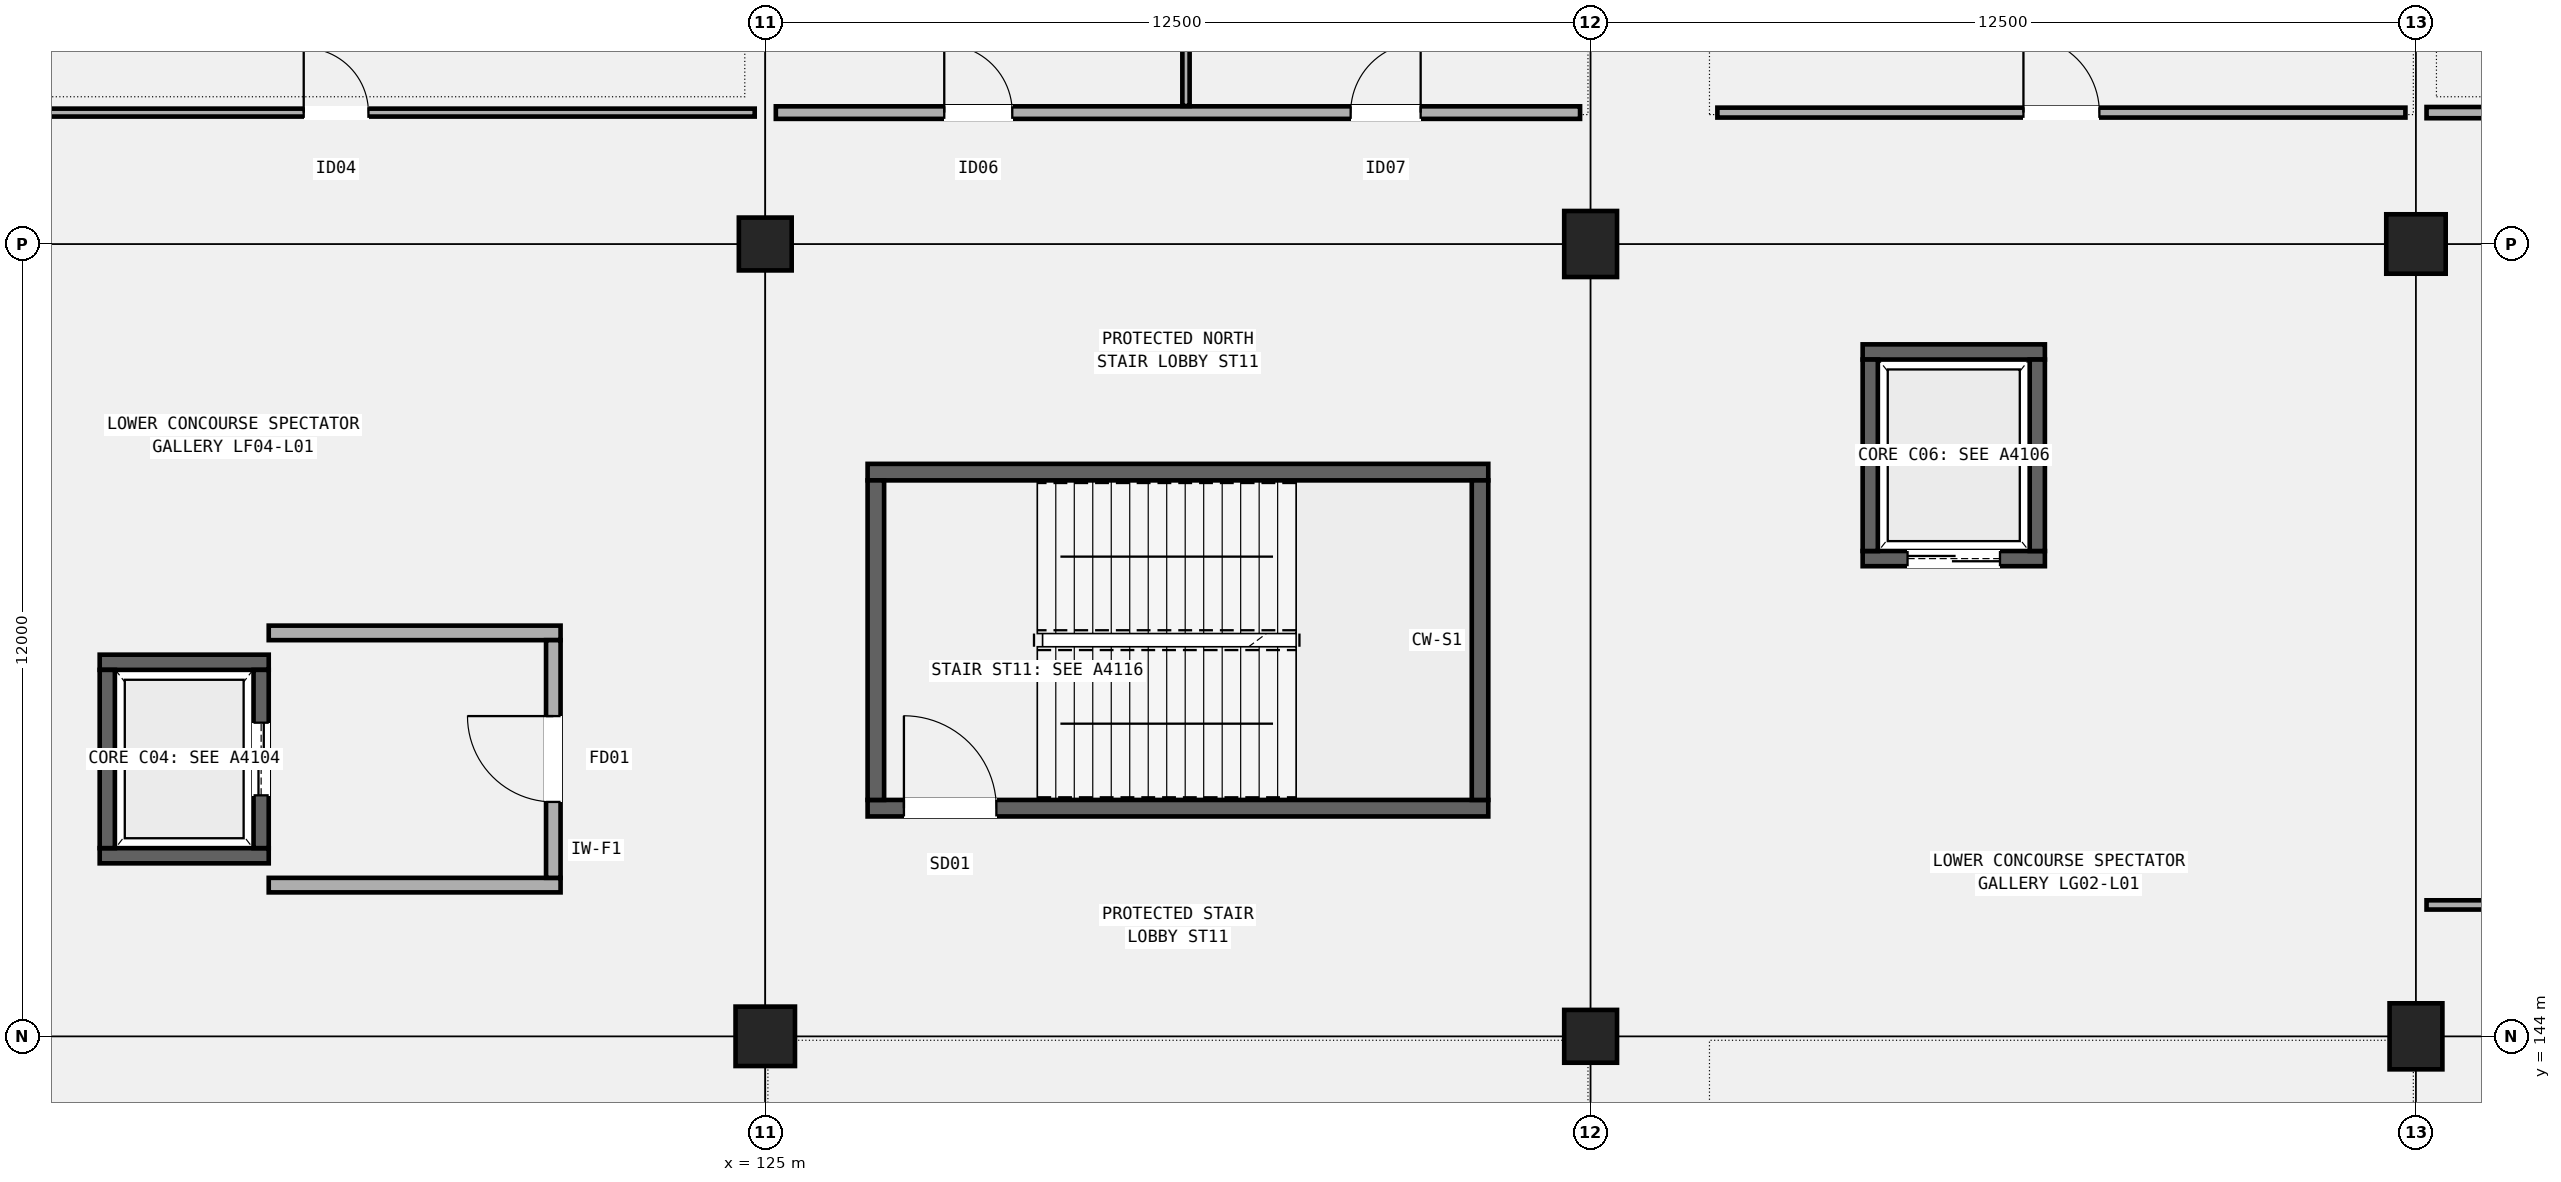
"""IFC4 building model, lengths in metres.
Left out: names, types, materials, properties, quantities, classifications, styles, units other than length and angle.
Written with IfcOpenShell. Run it as: python <this file> out.ifc"""

import sys

from ifc_helpers import new_model, si_unit, direction, frame, frame_2d, origin, origin_2d, place, context, subcontext, project, spatial, rectangle, extrude, element, fill, save


model = new_model("IFC4")
c1 = context("Model", 3, precision=1e-05, world=origin(), true_north=direction((0.0, 1.0)))
c2 = subcontext(c1, "Body", "Model", "MODEL_VIEW")
j1 = project(units=[si_unit("LENGTHUNIT", "METRE"), si_unit("PLANEANGLEUNIT", "RADIAN")], contexts=[c1])
p1 = place(None, origin())
s1 = spatial("IfcSite", under=j1, at=p1, CompositionType="ELEMENT")
p2 = place(p1, origin())
s2 = spatial("IfcBuilding", under=s1, at=p2, CompositionType="ELEMENT")
p3 = place(p2, frame((0.0, 0.0, 5.4)))
s3 = spatial("IfcBuildingStorey", under=s2, at=p3, CompositionType="ELEMENT", Elevation=5.4)
p4 = place(p3, frame((125.0, 144.0, 0.0), z_axis=(0.0, 0.0, 1.0), x_axis=(1.0, 0.0, 0.0)))
e1 = element("IfcColumn", 1, at=p4, inside=s3, PredefinedType="COLUMN", context=c2, shape_type="SweptSolid", body=[
    extrude(rectangle(XDim=0.9, YDim=0.9, at=origin_2d()), origin(), (0.0, 0.0, 1.0), 4.8),
])
for number, where, z_axis, x_axis in (
    (2, (125.0, 156.0, 0.0), (0.0, 0.0, 1.0), (1.0, 0.0, 0.0)),
    (3, (137.5, 144.0, 0.0), (0.0, 0.0, 1.0), (1.0, 0.0, 0.0)),
):
    element("IfcColumn", number, at=place(p3, frame(where, z_axis=z_axis, x_axis=x_axis)), inside=s3, PredefinedType="COLUMN", context=c2, shape_type="SweptSolid", body=[
        extrude(rectangle(XDim=0.8, YDim=0.8, at=origin_2d()), origin(), (0.0, 0.0, 1.0), 4.8),
    ])
for number, where, z_axis, x_axis in (
    (4, (137.5, 156.0, 0.0), (0.0, 0.0, 1.0), (1.0, 0.0, 0.0)),
    (5, (150.0, 144.0, 0.0), (0.0, 0.0, 1.0), (1.0, 0.0, 0.0)),
):
    element("IfcColumn", number, at=place(p3, frame(where, z_axis=z_axis, x_axis=x_axis)), inside=s3, PredefinedType="COLUMN", context=c2, shape_type="SweptSolid", body=[
        extrude(rectangle(XDim=0.8, YDim=1.0, at=origin_2d()), origin(), (0.0, 0.0, 1.0), 4.8),
    ])
p5 = place(p3, frame((150.0, 156.0, 0.0), z_axis=(0.0, 0.0, 1.0), x_axis=(1.0, 0.0, 0.0)))
e6 = element("IfcColumn", 6, at=p5, inside=s3, PredefinedType="COLUMN", context=c2, shape_type="SweptSolid", body=[
    extrude(rectangle(XDim=0.9, YDim=0.9, at=origin_2d()), origin(), (0.0, 0.0, 1.0), 4.8),
])
p6 = place(p3, frame((126.55, 147.455, 0.0), z_axis=(0.0, 0.0, 1.0), x_axis=(1.0, 0.0, 0.0)))
e7 = element("IfcWall", 7, at=p6, inside=s3, PredefinedType="SHEAR", context=c2, shape_type="SweptSolid", body=[
    extrude(rectangle(XDim=9.4, YDim=0.25, at=frame_2d((4.7, 0.0))), origin(), (0.0, 0.0, 1.0), 4.55),
])
p7 = place(p6, frame((0.55, 0.0, 0.0)))
e8 = element("IfcOpeningElement", 8, at=p7, cuts=e7, PredefinedType="OPENING", context=c2, shape_type="SweptSolid", body=[
    extrude(rectangle(XDim=1.4, YDim=2.15, at=frame_2d((0.7, 1.075))), frame((0.0, 0.135, 0.0), z_axis=(0.0, -1.0, 0.0), x_axis=(1.0, 0.0, 0.0)), (0.0, 0.0, 1.0), 0.27),
])
p8 = place(p3, frame((126.55, 152.545, 0.0), z_axis=(0.0, 0.0, 1.0), x_axis=(1.0, 0.0, 0.0)))
e9 = element("IfcWall", 9, at=p8, inside=s3, PredefinedType="SHEAR", context=c2, shape_type="SweptSolid", body=[
    extrude(rectangle(XDim=9.4, YDim=0.25, at=frame_2d((4.7, 0.0))), origin(), (0.0, 0.0, 1.0), 4.55),
])
for number, where, z_axis, x_axis in (
    (10, (126.675, 147.58, 0.0), (0.0, 0.0, 1.0), (0.0, 1.0, 0.0)),
    (11, (135.825, 147.58, 0.0), (0.0, 0.0, 1.0), (0.0, 1.0, 0.0)),
):
    element("IfcWall", number, at=place(p3, frame(where, z_axis=z_axis, x_axis=x_axis)), inside=s3, PredefinedType="SHEAR", context=c2, shape_type="SweptSolid", body=[
        extrude(rectangle(XDim=4.84, YDim=0.25, at=frame_2d((2.42, 0.0))), origin(), (0.0, 0.0, 1.0), 4.55),
    ])
for number, where, z_axis, x_axis in (
    (12, (114.92, 146.735, 0.0), (0.0, 0.0, 1.0), (1.0, 0.0, 0.0)),
    (13, (114.92, 149.665, 0.0), (0.0, 0.0, 1.0), (1.0, 0.0, 0.0)),
):
    element("IfcWall", number, at=place(p3, frame(where, z_axis=z_axis, x_axis=x_axis)), inside=s3, PredefinedType="SHEAR", context=c2, shape_type="SweptSolid", body=[
        extrude(rectangle(XDim=2.56, YDim=0.23, at=frame_2d((1.28, 0.0))), origin(), (0.0, 0.0, 1.0), 4.55),
    ])
p9 = place(p3, frame((115.035, 146.85, 0.0), z_axis=(0.0, 0.0, 1.0), x_axis=(0.0, 1.0, 0.0)))
e14 = element("IfcWall", 14, at=p9, inside=s3, PredefinedType="SHEAR", context=c2, shape_type="SweptSolid", body=[
    extrude(rectangle(XDim=2.7, YDim=0.23, at=frame_2d((1.35, 0.0))), origin(), (0.0, 0.0, 1.0), 4.55),
])
p10 = place(p3, frame((117.365, 146.85, 0.0), z_axis=(0.0, 0.0, 1.0), x_axis=(0.0, 1.0, 0.0)))
e15 = element("IfcWall", 15, at=p10, inside=s3, PredefinedType="SHEAR", context=c2, shape_type="SweptSolid", body=[
    extrude(rectangle(XDim=2.7, YDim=0.23, at=frame_2d((1.35, 0.0))), origin(), (0.0, 0.0, 1.0), 4.55),
])
p11 = place(p10, frame((0.8, 0.0, 0.0)))
e16 = element("IfcOpeningElement", 16, at=p11, cuts=e15, PredefinedType="OPENING", context=c2, shape_type="SweptSolid", body=[
    extrude(rectangle(XDim=1.1, YDim=2.15, at=frame_2d((0.55, 1.075))), frame((0.0, 0.125, 0.0), z_axis=(0.0, -1.0, 0.0), x_axis=(1.0, 0.0, 0.0)), (0.0, 0.0, 1.0), 0.25),
])
for number, where, z_axis, x_axis in (
    (17, (117.48, 146.29, 0.0), (0.0, 0.0, 1.0), (1.0, 0.0, 0.0)),
    (18, (117.48, 150.11, 0.0), (0.0, 0.0, 1.0), (1.0, 0.0, 0.0)),
):
    element("IfcWall", number, at=place(p3, frame(where, z_axis=z_axis, x_axis=x_axis)), inside=s3, PredefinedType="SOLIDWALL", context=c2, shape_type="SweptSolid", body=[
        extrude(rectangle(XDim=4.42, YDim=0.22, at=frame_2d((2.21, 0.0))), origin(), (0.0, 0.0, 1.0), 3.92),
    ])
p12 = place(p3, frame((121.79, 146.4, 0.0), z_axis=(0.0, 0.0, 1.0), x_axis=(0.0, 1.0, 0.0)))
e19 = element("IfcWall", 19, at=p12, inside=s3, PredefinedType="SOLIDWALL", context=c2, shape_type="SweptSolid", body=[
    extrude(rectangle(XDim=3.6, YDim=0.22, at=frame_2d((1.8, 0.0))), origin(), (0.0, 0.0, 1.0), 3.92),
])
p13 = place(p12, frame((1.15, 0.0, 0.0)))
e20 = element("IfcOpeningElement", 20, at=p13, cuts=e19, PredefinedType="OPENING", context=c2, shape_type="SweptSolid", body=[
    extrude(rectangle(XDim=1.3, YDim=2.15, at=frame_2d((0.65, 1.075))), frame((0.0, 0.12, 0.0), z_axis=(0.0, -1.0, 0.0), x_axis=(1.0, 0.0, 0.0)), (0.0, 0.0, 1.0), 0.24),
])
p14 = place(p3, frame((141.62, 151.235, 0.0), z_axis=(0.0, 0.0, 1.0), x_axis=(1.0, 0.0, 0.0)))
e21 = element("IfcWall", 21, at=p14, inside=s3, PredefinedType="SHEAR", context=c2, shape_type="SweptSolid", body=[
    extrude(rectangle(XDim=2.76, YDim=0.23, at=frame_2d((1.38, 0.0))), origin(), (0.0, 0.0, 1.0), 4.55),
])
p15 = place(p14, frame((0.68, 0.0, 0.0)))
e22 = element("IfcOpeningElement", 22, at=p15, cuts=e21, PredefinedType="OPENING", context=c2, shape_type="SweptSolid", body=[
    extrude(rectangle(XDim=1.4, YDim=2.25, at=frame_2d((0.7, 1.125))), frame((0.0, 0.125, 0.0), z_axis=(0.0, -1.0, 0.0), x_axis=(1.0, 0.0, 0.0)), (0.0, 0.0, 1.0), 0.25),
])
p16 = place(p3, frame((141.62, 154.365, 0.0), z_axis=(0.0, 0.0, 1.0), x_axis=(1.0, 0.0, 0.0)))
e23 = element("IfcWall", 23, at=p16, inside=s3, PredefinedType="SHEAR", context=c2, shape_type="SweptSolid", body=[
    extrude(rectangle(XDim=2.76, YDim=0.23, at=frame_2d((1.38, 0.0))), origin(), (0.0, 0.0, 1.0), 4.55),
])
for number, where, z_axis, x_axis in (
    (24, (141.735, 151.35, 0.0), (0.0, 0.0, 1.0), (0.0, 1.0, 0.0)),
    (25, (144.265, 151.35, 0.0), (0.0, 0.0, 1.0), (0.0, 1.0, 0.0)),
):
    element("IfcWall", number, at=place(p3, frame(where, z_axis=z_axis, x_axis=x_axis)), inside=s3, PredefinedType="SHEAR", context=c2, shape_type="SweptSolid", body=[
        extrude(rectangle(XDim=2.9, YDim=0.23, at=frame_2d((1.45, 0.0))), origin(), (0.0, 0.0, 1.0), 4.55),
    ])
p17 = place(p3, frame((112.16, 157.99, 0.0), z_axis=(0.0, 0.0, 1.0), x_axis=(1.0, 0.0, 0.0)))
e26 = element("IfcWall", 26, at=p17, inside=s3, PredefinedType="PARTITIONING", context=c2, shape_type="SweptSolid", body=[
    extrude(rectangle(XDim=12.68, YDim=0.12, at=frame_2d((6.34, 0.0))), origin(), (0.0, 0.0, 1.0), 3.92),
])
p18 = place(p17, frame((5.85, 0.0, 0.0)))
e27 = element("IfcOpeningElement", 27, at=p18, cuts=e26, PredefinedType="OPENING", context=c2, shape_type="SweptSolid", body=[
    extrude(rectangle(XDim=0.98, YDim=2.1, at=frame_2d((0.49, 1.05))), frame((0.0, 0.07, 0.0), z_axis=(0.0, -1.0, 0.0), x_axis=(1.0, 0.0, 0.0)), (0.0, 0.0, 1.0), 0.14),
])
p19 = place(p3, frame((125.16, 157.99, 0.0), z_axis=(0.0, 0.0, 1.0), x_axis=(1.0, 0.0, 0.0)))
e28 = element("IfcWall", 28, at=p19, inside=s3, PredefinedType="PARTITIONING", context=c2, shape_type="SweptSolid", body=[
    extrude(rectangle(XDim=12.18, YDim=0.19, at=frame_2d((6.09, 0.0))), origin(), (0.0, 0.0, 1.0), 3.92),
])
p20 = place(p19, frame((2.551, 0.0, 0.0)))
e29 = element("IfcOpeningElement", 29, at=p20, cuts=e28, PredefinedType="OPENING", context=c2, shape_type="SweptSolid", body=[
    extrude(rectangle(XDim=1.03, YDim=2.12, at=frame_2d((0.515, 1.06))), frame((0.0, 0.105, 0.0), z_axis=(0.0, -1.0, 0.0), x_axis=(1.0, 0.0, 0.0)), (0.0, 0.0, 1.0), 0.21),
])
p21 = place(p19, frame((8.706, 0.0, 0.0)))
e30 = element("IfcOpeningElement", 30, at=p21, cuts=e28, PredefinedType="OPENING", context=c2, shape_type="SweptSolid", body=[
    extrude(rectangle(XDim=1.06, YDim=2.15, at=frame_2d((0.53, 1.075))), frame((0.0, 0.105, 0.0), z_axis=(0.0, -1.0, 0.0), x_axis=(1.0, 0.0, 0.0)), (0.0, 0.0, 1.0), 0.21),
])
p22 = place(p3, frame((131.372, 158.09, 0.0), z_axis=(0.0, 0.0, 1.0), x_axis=(0.0, 1.0, 0.0)))
e31 = element("IfcWall", 31, at=p22, inside=s3, PredefinedType="PARTITIONING", context=c2, shape_type="SweptSolid", body=[
    extrude(rectangle(XDim=9.738, YDim=0.11, at=frame_2d((4.869, 0.0))), origin(), (0.0, 0.0, 1.0), 3.92),
])
p23 = place(p3, frame((139.42, 157.99, 0.0), z_axis=(0.0, 0.0, 1.0), x_axis=(1.0, 0.0, 0.0)))
e32 = element("IfcWall", 32, at=p23, inside=s3, PredefinedType="PARTITIONING", context=c2, shape_type="SweptSolid", body=[
    extrude(rectangle(XDim=10.42, YDim=0.15, at=frame_2d((5.21, 0.0))), origin(), (0.0, 0.0, 1.0), 3.92),
])
p24 = place(p23, frame((4.635, 0.0, 0.0)))
e33 = element("IfcOpeningElement", 33, at=p24, cuts=e32, PredefinedType="OPENING", context=c2, shape_type="SweptSolid", body=[
    extrude(rectangle(XDim=1.15, YDim=2.15, at=frame_2d((0.575, 1.075))), frame((0.0, 0.085, 0.0), z_axis=(0.0, -1.0, 0.0), x_axis=(1.0, 0.0, 0.0)), (0.0, 0.0, 1.0), 0.17),
])
p25 = place(p3, frame((150.16, 145.99, 0.0), z_axis=(0.0, 0.0, 1.0), x_axis=(1.0, 0.0, 0.0)))
e34 = element("IfcWall", 34, at=p25, inside=s3, PredefinedType="PARTITIONING", context=c2, shape_type="SweptSolid", body=[
    extrude(rectangle(XDim=12.18, YDim=0.14, at=frame_2d((6.09, 0.0))), origin(), (0.0, 0.0, 1.0), 3.92),
])
p26 = place(p25, frame((5.47, 0.0, 0.0)))
e35 = element("IfcOpeningElement", 35, at=p26, cuts=e34, PredefinedType="OPENING", context=c2, shape_type="SweptSolid", body=[
    extrude(rectangle(XDim=1.24, YDim=2.22, at=frame_2d((0.62, 1.11))), frame((0.0, 0.08, 0.0), z_axis=(0.0, -1.0, 0.0), x_axis=(1.0, 0.0, 0.0)), (0.0, 0.0, 1.0), 0.16),
])
p27 = place(p3, frame((150.16, 157.99, 0.0), z_axis=(0.0, 0.0, 1.0), x_axis=(1.0, 0.0, 0.0)))
e36 = element("IfcWall", 36, at=p27, inside=s3, PredefinedType="PARTITIONING", context=c2, shape_type="SweptSolid", body=[
    extrude(rectangle(XDim=12.18, YDim=0.17, at=frame_2d((6.09, 0.0))), origin(), (0.0, 0.0, 1.0), 3.92),
])
p28 = place(p27, frame((5.455, 0.0, 0.0)))
e37 = element("IfcOpeningElement", 37, at=p28, cuts=e36, PredefinedType="OPENING", context=c2, shape_type="SweptSolid", body=[
    extrude(rectangle(XDim=1.27, YDim=2.2, at=frame_2d((0.635, 1.1))), frame((0.0, 0.095, 0.0), z_axis=(0.0, -1.0, 0.0), x_axis=(1.0, 0.0, 0.0)), (0.0, 0.0, 1.0), 0.19),
])
p29 = place(p7, origin())
e38 = element("IfcDoor", 38, at=p29, inside=s3, OperationType="SINGLE_SWING_LEFT", PredefinedType="DOOR", context=c2, shape_type="SweptSolid", body=[
    extrude(rectangle(XDim=1.4, YDim=2.15, at=frame_2d((0.7, 1.075))), frame((0.0, 0.025, 0.0), z_axis=(0.0, -1.0, 0.0), x_axis=(1.0, 0.0, 0.0)), (0.0, 0.0, 1.0), 0.05),
])
fill(e8, e38)
p30 = place(p11, origin())
e39 = element("IfcDoor", 39, at=p30, inside=s3, OperationType="DOUBLE_DOOR_SLIDING", PredefinedType="DOOR", context=c2, shape_type="SweptSolid", body=[
    extrude(rectangle(XDim=1.1, YDim=2.15, at=frame_2d((0.55, 1.075))), frame((0.0, 0.025, 0.0), z_axis=(0.0, -1.0, 0.0), x_axis=(1.0, 0.0, 0.0)), (0.0, 0.0, 1.0), 0.05),
])
fill(e16, e39)
p31 = place(p13, origin())
e40 = element("IfcDoor", 40, at=p31, inside=s3, OperationType="SINGLE_SWING_RIGHT", PredefinedType="DOOR", context=c2, shape_type="SweptSolid", body=[
    extrude(rectangle(XDim=1.3, YDim=2.15, at=frame_2d((0.65, 1.075))), frame((0.0, 0.025, 0.0), z_axis=(0.0, -1.0, 0.0), x_axis=(1.0, 0.0, 0.0)), (0.0, 0.0, 1.0), 0.05),
])
fill(e20, e40)
p32 = place(p15, origin())
e41 = element("IfcDoor", 41, at=p32, inside=s3, OperationType="DOUBLE_DOOR_SLIDING", PredefinedType="DOOR", context=c2, shape_type="SweptSolid", body=[
    extrude(rectangle(XDim=1.4, YDim=2.25, at=frame_2d((0.7, 1.125))), frame((0.0, 0.025, 0.0), z_axis=(0.0, -1.0, 0.0), x_axis=(1.0, 0.0, 0.0)), (0.0, 0.0, 1.0), 0.05),
])
fill(e22, e41)
p33 = place(p18, origin())
e42 = element("IfcDoor", 42, at=p33, inside=s3, OperationType="SINGLE_SWING_LEFT", PredefinedType="DOOR", context=c2, shape_type="SweptSolid", body=[
    extrude(rectangle(XDim=0.98, YDim=2.1, at=frame_2d((0.49, 1.05))), frame((0.0, 0.025, 0.0), z_axis=(0.0, -1.0, 0.0), x_axis=(1.0, 0.0, 0.0)), (0.0, 0.0, 1.0), 0.05),
])
fill(e27, e42)
p34 = place(p20, origin())
e43 = element("IfcDoor", 43, at=p34, inside=s3, OperationType="SINGLE_SWING_LEFT", PredefinedType="DOOR", context=c2, shape_type="SweptSolid", body=[
    extrude(rectangle(XDim=1.03, YDim=2.12, at=frame_2d((0.515, 1.06))), frame((0.0, 0.025, 0.0), z_axis=(0.0, -1.0, 0.0), x_axis=(1.0, 0.0, 0.0)), (0.0, 0.0, 1.0), 0.05),
])
fill(e29, e43)
p35 = place(p21, origin())
e44 = element("IfcDoor", 44, at=p35, inside=s3, OperationType="SINGLE_SWING_RIGHT", PredefinedType="DOOR", context=c2, shape_type="SweptSolid", body=[
    extrude(rectangle(XDim=1.06, YDim=2.15, at=frame_2d((0.53, 1.075))), frame((0.0, 0.025, 0.0), z_axis=(0.0, -1.0, 0.0), x_axis=(1.0, 0.0, 0.0)), (0.0, 0.0, 1.0), 0.05),
])
fill(e30, e44)
p36 = place(p24, origin())
e45 = element("IfcDoor", 45, at=p36, inside=s3, OperationType="SINGLE_SWING_LEFT", PredefinedType="DOOR", context=c2, shape_type="SweptSolid", body=[
    extrude(rectangle(XDim=1.15, YDim=2.15, at=frame_2d((0.575, 1.075))), frame((0.0, 0.025, 0.0), z_axis=(0.0, -1.0, 0.0), x_axis=(1.0, 0.0, 0.0)), (0.0, 0.0, 1.0), 0.05),
])
fill(e33, e45)
save(model, sys.argv[1])
